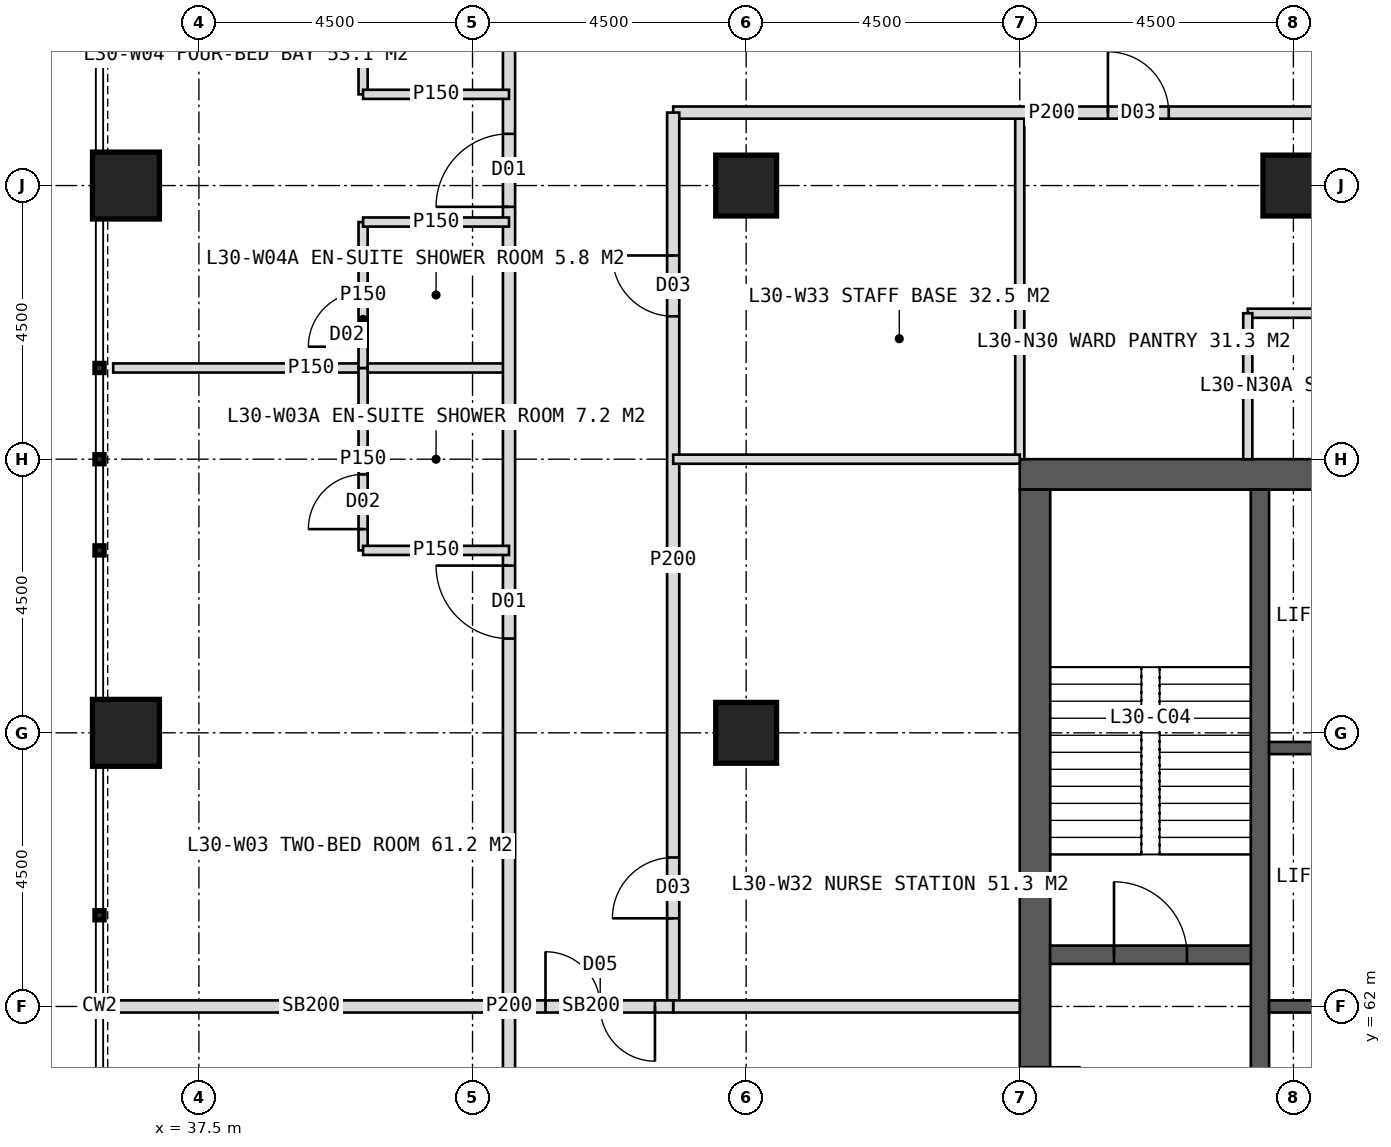
"""IFC4 building model, lengths in metres.
Left out: names, types, materials, properties, quantities, classifications, styles, units other than length and angle.
Written with IfcOpenShell. Run it as: python <this file> out.ifc"""

import sys

from ifc_helpers import new_model, si_unit, direction, frame, frame_2d, origin, origin_2d, place, context, subcontext, project, spatial, rectangle, hollow_rectangle, extrude, element, fill, save


model = new_model("IFC4")
c1 = context("Model", 3, precision=1e-05, world=origin(), true_north=direction((0.0, 1.0)))
c2 = subcontext(c1, "Body", "Model", "MODEL_VIEW")
j1 = project(units=[si_unit("LENGTHUNIT", "METRE"), si_unit("PLANEANGLEUNIT", "RADIAN")], contexts=[c1])
p1 = place(None, origin())
s1 = spatial("IfcSite", under=j1, at=p1, CompositionType="ELEMENT")
p2 = place(p1, origin())
s2 = spatial("IfcBuilding", under=s1, at=p2, CompositionType="ELEMENT")
p3 = place(p2, frame((0.0, 0.0, 128.0)))
s3 = spatial("IfcBuildingStorey", under=s2, at=p3, CompositionType="ELEMENT", Elevation=128.0)
p4 = place(p3, frame((51.0, 70.75, 0.0), z_axis=(0.0, 0.0, 1.0), x_axis=(1.0, 0.0, 0.0)))
e1 = element("IfcWall", 1, at=p4, inside=s3, PredefinedType="SHEAR", context=c2, shape_type="SweptSolid", body=[
    extrude(rectangle(XDim=18.0, YDim=0.5, at=frame_2d((9.0, 0.0))), origin(), (0.0, 0.0, 1.0), 4.0),
])
p5 = place(p4, frame((8.1, 0.0, 0.0)))
e2 = element("IfcOpeningElement", 2, at=p5, cuts=e1, PredefinedType="OPENING", context=c2, shape_type="SweptSolid", body=[
    extrude(rectangle(XDim=1.8, YDim=2.2, at=frame_2d((0.9, 1.1))), frame((0.0, 0.26, 0.0), z_axis=(0.0, -1.0, 0.0), x_axis=(1.0, 0.0, 0.0)), (0.0, 0.0, 1.0), 0.52),
])
p6 = place(p3, frame((51.25, 53.5, 0.0), z_axis=(0.0, 0.0, 1.0), x_axis=(0.0, 1.0, 0.0)))
e3 = element("IfcWall", 3, at=p6, inside=s3, PredefinedType="SHEAR", context=c2, shape_type="SweptSolid", body=[
    extrude(rectangle(XDim=17.0, YDim=0.5, at=frame_2d((8.5, 0.0))), origin(), (0.0, 0.0, 1.0), 4.0),
])
p7 = place(p6, frame((6.0, 0.0, 0.0)))
e4 = element("IfcOpeningElement", 4, at=p7, cuts=e3, PredefinedType="OPENING", context=c2, shape_type="SweptSolid", body=[
    extrude(rectangle(XDim=1.5, YDim=2.2, at=frame_2d((0.75, 1.1))), frame((0.0, 0.26, 0.0), z_axis=(0.0, -1.0, 0.0), x_axis=(1.0, 0.0, 0.0)), (0.0, 0.0, 1.0), 0.52),
])
p8 = place(p3, frame((54.95, 53.5, 0.0), z_axis=(0.0, 0.0, 1.0), x_axis=(0.0, 1.0, 0.0)))
e5 = element("IfcWall", 5, at=p8, inside=s3, PredefinedType="SHEAR", context=c2, shape_type="SweptSolid", body=[
    extrude(rectangle(XDim=17.0, YDim=0.3, at=frame_2d((8.5, 0.0))), origin(), (0.0, 0.0, 1.0), 4.0),
])
for number, where, z_axis, x_axis in (
    (6, (55.1, 62.0, 0.0), (0.0, 0.0, 1.0), (1.0, 0.0, 0.0)),
    (7, (55.1, 66.25, 0.0), (0.0, 0.0, 1.0), (1.0, 0.0, 0.0)),
):
    element("IfcWall", number, at=place(p3, frame(where, z_axis=z_axis, x_axis=x_axis)), inside=s3, PredefinedType="SHEAR", context=c2, shape_type="SweptSolid", body=[
        extrude(rectangle(XDim=3.05, YDim=0.2, at=frame_2d((1.525, 0.0))), origin(), (0.0, 0.0, 1.0), 4.0),
    ])
p9 = place(p3, frame((51.5, 62.85, 0.0), z_axis=(0.0, 0.0, 1.0), x_axis=(1.0, 0.0, 0.0)))
e8 = element("IfcWall", 8, at=p9, inside=s3, PredefinedType="SHEAR", context=c2, shape_type="SweptSolid", body=[
    extrude(rectangle(XDim=3.3, YDim=0.3, at=frame_2d((1.65, 0.0))), origin(), (0.0, 0.0, 1.0), 4.0),
])
p10 = place(p9, frame((1.05, 0.0, 0.0)))
e9 = element("IfcOpeningElement", 9, at=p10, cuts=e8, PredefinedType="OPENING", context=c2, shape_type="SweptSolid", body=[
    extrude(rectangle(XDim=1.2, YDim=2.1, at=frame_2d((0.6, 1.05))), frame((0.0, 0.16, 0.0), z_axis=(0.0, -1.0, 0.0), x_axis=(1.0, 0.0, 0.0)), (0.0, 0.0, 1.0), 0.32),
])
for number, where, z_axis, x_axis in (
    (10, (46.5, 75.5, 0.0), (0.0, 0.0, 1.0), (1.0, 0.0, 0.0)),
    (11, (55.5, 75.5, 0.0), (0.0, 0.0, 1.0), (1.0, 0.0, 0.0)),
    (12, (46.5, 66.5, 0.0), (0.0, 0.0, 1.0), (1.0, 0.0, 0.0)),
):
    element("IfcColumn", number, at=place(p3, frame(where, z_axis=z_axis, x_axis=x_axis)), inside=s3, PredefinedType="COLUMN", context=c2, shape_type="SweptSolid", body=[
        extrude(hollow_rectangle(XDim=1.0, YDim=1.0, WallThickness=0.1, at=origin_2d()), origin(), (0.0, 0.0, 1.0), 4.0),
    ])
for number, where, z_axis, x_axis in (
    (13, (36.3, 66.5, 0.0), (0.0, 0.0, 1.0), (1.0, 0.0, 0.0)),
    (14, (36.3, 75.5, 0.0), (0.0, 0.0, 1.0), (1.0, 0.0, 0.0)),
):
    element("IfcColumn", number, at=place(p3, frame(where, z_axis=z_axis, x_axis=x_axis)), inside=s3, PredefinedType="COLUMN", context=c2, shape_type="SweptSolid", body=[
        extrude(hollow_rectangle(XDim=1.1, YDim=1.1, WallThickness=0.1, at=origin_2d()), origin(), (0.0, 0.0, 1.0), 4.0),
    ])
p11 = place(p3, frame((51.0, 71.0, 0.0), z_axis=(0.0, 0.0, 1.0), x_axis=(0.0, 1.0, 0.0)))
e15 = element("IfcWall", 15, at=p11, inside=s3, PredefinedType="PARTITIONING", context=c2, shape_type="SweptSolid", body=[
    extrude(rectangle(XDim=5.7, YDim=0.15, at=frame_2d((2.85, 0.0))), origin(), (0.0, 0.0, 1.0), 3.75),
])
p12 = place(p3, frame((45.3, 76.7, 0.0), z_axis=(0.0, 0.0, 1.0), x_axis=(1.0, 0.0, 0.0)))
e16 = element("IfcWall", 16, at=p12, inside=s3, PredefinedType="PARTITIONING", context=c2, shape_type="SweptSolid", body=[
    extrude(rectangle(XDim=12.45, YDim=0.2, at=frame_2d((6.225, 0.0))), origin(), (0.0, 0.0, 1.0), 3.75),
])
p13 = place(p12, frame((7.15, 0.0, 0.0)))
e17 = element("IfcOpeningElement", 17, at=p13, cuts=e16, PredefinedType="OPENING", context=c2, shape_type="SweptSolid", body=[
    extrude(rectangle(XDim=1.0, YDim=2.1, at=frame_2d((0.5, 1.05))), frame((0.0, 0.11, 0.0), z_axis=(0.0, -1.0, 0.0), x_axis=(1.0, 0.0, 0.0)), (0.0, 0.0, 1.0), 0.22),
])
p14 = place(p3, frame((54.75, 73.4, 0.0), z_axis=(0.0, 0.0, 1.0), x_axis=(1.0, 0.0, 0.0)))
e18 = element("IfcWall", 18, at=p14, inside=s3, PredefinedType="PARTITIONING", context=c2, shape_type="SweptSolid", body=[
    extrude(rectangle(XDim=3.0, YDim=0.15, at=frame_2d((1.5, 0.0))), origin(), (0.0, 0.0, 1.0), 3.75),
])
p15 = place(p3, frame((54.75, 71.0, 0.0), z_axis=(0.0, 0.0, 1.0), x_axis=(0.0, 1.0, 0.0)))
e19 = element("IfcWall", 19, at=p15, inside=s3, PredefinedType="PARTITIONING", context=c2, shape_type="SweptSolid", body=[
    extrude(rectangle(XDim=2.4, YDim=0.15, at=frame_2d((1.2, 0.0))), origin(), (0.0, 0.0, 1.0), 3.75),
])
p16 = place(p3, frame((42.6, 62.0, 0.0), z_axis=(0.0, 0.0, 1.0), x_axis=(-1.0, 0.0, 0.0)))
e20 = element("IfcWall", 20, at=p16, inside=s3, PredefinedType="SOLIDWALL", context=c2, shape_type="SweptSolid", body=[
    extrude(rectangle(XDim=6.51, YDim=0.2, at=frame_2d((3.255, 0.0))), origin(), (0.0, 0.0, 1.0), 2.95),
])
p17 = place(p3, frame((42.6, 72.5, 0.0), z_axis=(0.0, 0.0, 1.0), x_axis=(-1.0, 0.0, 0.0)))
e21 = element("IfcWall", 21, at=p17, inside=s3, PredefinedType="PARTITIONING", context=c2, shape_type="SweptSolid", body=[
    extrude(rectangle(XDim=6.51, YDim=0.15, at=frame_2d((3.255, 0.0))), origin(), (0.0, 0.0, 1.0), 3.75),
])
p18 = place(p3, frame((42.6, 44.6, 0.0), z_axis=(0.0, 0.0, 1.0), x_axis=(0.0, 1.0, 0.0)))
e22 = element("IfcWall", 22, at=p18, inside=s3, PredefinedType="PARTITIONING", context=c2, shape_type="SweptSolid", body=[
    extrude(rectangle(XDim=34.8, YDim=0.2, at=frame_2d((17.4, 0.0))), origin(), (0.0, 0.0, 1.0), 3.75),
])
p19 = place(p18, frame((2.45, 0.0, 0.0)))
e23 = element("IfcOpeningElement", 23, at=p19, cuts=e22, PredefinedType="OPENING", context=c2, shape_type="SweptSolid", body=[
    extrude(rectangle(XDim=1.2, YDim=2.2, at=frame_2d((0.6, 1.1))), frame((0.0, 0.11, 0.0), z_axis=(0.0, -1.0, 0.0), x_axis=(1.0, 0.0, 0.0)), (0.0, 0.0, 1.0), 0.22),
])
p20 = place(p18, frame((10.15, 0.0, 0.0)))
e24 = element("IfcOpeningElement", 24, at=p20, cuts=e22, PredefinedType="OPENING", context=c2, shape_type="SweptSolid", body=[
    extrude(rectangle(XDim=1.2, YDim=2.2, at=frame_2d((0.6, 1.1))), frame((0.0, 0.11, 0.0), z_axis=(0.0, -1.0, 0.0), x_axis=(1.0, 0.0, 0.0)), (0.0, 0.0, 1.0), 0.22),
])
p21 = place(p18, frame((23.45, 0.0, 0.0)))
e25 = element("IfcOpeningElement", 25, at=p21, cuts=e22, PredefinedType="OPENING", context=c2, shape_type="SweptSolid", body=[
    extrude(rectangle(XDim=1.2, YDim=2.2, at=frame_2d((0.6, 1.1))), frame((0.0, 0.11, 0.0), z_axis=(0.0, -1.0, 0.0), x_axis=(1.0, 0.0, 0.0)), (0.0, 0.0, 1.0), 0.22),
])
p22 = place(p18, frame((30.55, 0.0, 0.0)))
e26 = element("IfcOpeningElement", 26, at=p22, cuts=e22, PredefinedType="OPENING", context=c2, shape_type="SweptSolid", body=[
    extrude(rectangle(XDim=1.2, YDim=2.2, at=frame_2d((0.6, 1.1))), frame((0.0, 0.11, 0.0), z_axis=(0.0, -1.0, 0.0), x_axis=(1.0, 0.0, 0.0)), (0.0, 0.0, 1.0), 0.22),
])
p23 = place(p3, frame((40.2, 69.5, 0.0), z_axis=(0.0, 0.0, 1.0), x_axis=(0.0, 1.0, 0.0)))
e27 = element("IfcWall", 27, at=p23, inside=s3, PredefinedType="PARTITIONING", context=c2, shape_type="SweptSolid", body=[
    extrude(rectangle(XDim=3.0, YDim=0.15, at=frame_2d((1.5, 0.0))), origin(), (0.0, 0.0, 1.0), 3.75),
])
p24 = place(p23, frame((0.35, 0.0, 0.0)))
e28 = element("IfcOpeningElement", 28, at=p24, cuts=e27, PredefinedType="OPENING", context=c2, shape_type="SweptSolid", body=[
    extrude(rectangle(XDim=0.9, YDim=2.1, at=frame_2d((0.45, 1.05))), frame((0.0, 0.085, 0.0), z_axis=(0.0, -1.0, 0.0), x_axis=(1.0, 0.0, 0.0)), (0.0, 0.0, 1.0), 0.17),
])
p25 = place(p3, frame((42.6, 69.5, 0.0), z_axis=(0.0, 0.0, 1.0), x_axis=(-1.0, 0.0, 0.0)))
e29 = element("IfcWall", 29, at=p25, inside=s3, PredefinedType="PARTITIONING", context=c2, shape_type="SweptSolid", body=[
    extrude(rectangle(XDim=2.4, YDim=0.15, at=frame_2d((1.2, 0.0))), origin(), (0.0, 0.0, 1.0), 3.75),
])
p26 = place(p3, frame((40.2, 72.5, 0.0), z_axis=(0.0, 0.0, 1.0), x_axis=(0.0, 1.0, 0.0)))
e30 = element("IfcWall", 30, at=p26, inside=s3, PredefinedType="PARTITIONING", context=c2, shape_type="SweptSolid", body=[
    extrude(rectangle(XDim=2.4, YDim=0.15, at=frame_2d((1.2, 0.0))), origin(), (0.0, 0.0, 1.0), 3.75),
])
p27 = place(p26, frame((0.35, 0.0, 0.0)))
e31 = element("IfcOpeningElement", 31, at=p27, cuts=e30, PredefinedType="OPENING", context=c2, shape_type="SweptSolid", body=[
    extrude(rectangle(XDim=0.9, YDim=2.1, at=frame_2d((0.45, 1.05))), frame((0.0, 0.085, 0.0), z_axis=(0.0, -1.0, 0.0), x_axis=(1.0, 0.0, 0.0)), (0.0, 0.0, 1.0), 0.17),
])
p28 = place(p3, frame((42.6, 74.9, 0.0), z_axis=(0.0, 0.0, 1.0), x_axis=(-1.0, 0.0, 0.0)))
e32 = element("IfcWall", 32, at=p28, inside=s3, PredefinedType="PARTITIONING", context=c2, shape_type="SweptSolid", body=[
    extrude(rectangle(XDim=2.4, YDim=0.15, at=frame_2d((1.2, 0.0))), origin(), (0.0, 0.0, 1.0), 3.75),
])
p29 = place(p3, frame((40.2, 77.0, 0.0), z_axis=(0.0, 0.0, 1.0), x_axis=(0.0, 1.0, 0.0)))
e33 = element("IfcWall", 33, at=p29, inside=s3, PredefinedType="PARTITIONING", context=c2, shape_type="SweptSolid", body=[
    extrude(rectangle(XDim=2.4, YDim=0.15, at=frame_2d((1.2, 0.0))), origin(), (0.0, 0.0, 1.0), 3.75),
])
p30 = place(p29, frame((1.15, 0.0, 0.0)))
e34 = element("IfcOpeningElement", 34, at=p30, cuts=e33, PredefinedType="OPENING", context=c2, shape_type="SweptSolid", body=[
    extrude(rectangle(XDim=0.9, YDim=2.1, at=frame_2d((0.45, 1.05))), frame((0.0, 0.085, 0.0), z_axis=(0.0, -1.0, 0.0), x_axis=(1.0, 0.0, 0.0)), (0.0, 0.0, 1.0), 0.17),
])
p31 = place(p3, frame((42.6, 77.0, 0.0), z_axis=(0.0, 0.0, 1.0), x_axis=(-1.0, 0.0, 0.0)))
e35 = element("IfcWall", 35, at=p31, inside=s3, PredefinedType="PARTITIONING", context=c2, shape_type="SweptSolid", body=[
    extrude(rectangle(XDim=2.4, YDim=0.15, at=frame_2d((1.2, 0.0))), origin(), (0.0, 0.0, 1.0), 3.75),
])
p32 = place(p3, frame((45.3, 62.0, 0.0), z_axis=(0.0, 0.0, 1.0), x_axis=(0.0, 1.0, 0.0)))
e36 = element("IfcWall", 36, at=p32, inside=s3, PredefinedType="PARTITIONING", context=c2, shape_type="SweptSolid", body=[
    extrude(rectangle(XDim=14.7, YDim=0.2, at=frame_2d((7.35, 0.0))), origin(), (0.0, 0.0, 1.0), 3.75),
])
p33 = place(p32, frame((1.45, 0.0, 0.0)))
e37 = element("IfcOpeningElement", 37, at=p33, cuts=e36, PredefinedType="OPENING", context=c2, shape_type="SweptSolid", body=[
    extrude(rectangle(XDim=1.0, YDim=2.1, at=frame_2d((0.5, 1.05))), frame((0.0, 0.11, 0.0), z_axis=(0.0, -1.0, 0.0), x_axis=(1.0, 0.0, 0.0)), (0.0, 0.0, 1.0), 0.22),
])
p34 = place(p32, frame((11.35, 0.0, 0.0)))
e38 = element("IfcOpeningElement", 38, at=p34, cuts=e36, PredefinedType="OPENING", context=c2, shape_type="SweptSolid", body=[
    extrude(rectangle(XDim=1.0, YDim=2.1, at=frame_2d((0.5, 1.05))), frame((0.0, 0.11, 0.0), z_axis=(0.0, -1.0, 0.0), x_axis=(1.0, 0.0, 0.0)), (0.0, 0.0, 1.0), 0.22),
])
p35 = place(p3, frame((51.0, 62.0, 0.0), z_axis=(0.0, 0.0, 1.0), x_axis=(-1.0, 0.0, 0.0)))
e39 = element("IfcWall", 39, at=p35, inside=s3, PredefinedType="SOLIDWALL", context=c2, shape_type="SweptSolid", body=[
    extrude(rectangle(XDim=5.7, YDim=0.2, at=frame_2d((2.85, 0.0))), origin(), (0.0, 0.0, 1.0), 2.95),
])
p36 = place(p3, frame((51.0, 71.0, 0.0), z_axis=(0.0, 0.0, 1.0), x_axis=(-1.0, 0.0, 0.0)))
e40 = element("IfcWall", 40, at=p36, inside=s3, PredefinedType="PARTITIONING", context=c2, shape_type="SweptSolid", body=[
    extrude(rectangle(XDim=5.7, YDim=0.15, at=frame_2d((2.85, 0.0))), origin(), (0.0, 0.0, 1.0), 3.75),
])
p37 = place(p3, frame((45.3, 62.0, 0.0), z_axis=(0.0, 0.0, 1.0), x_axis=(-1.0, 0.0, 0.0)))
e41 = element("IfcWall", 41, at=p37, inside=s3, PredefinedType="SOLIDWALL", context=c2, shape_type="SweptSolid", body=[
    extrude(rectangle(XDim=2.7, YDim=0.2, at=frame_2d((1.35, 0.0))), origin(), (0.0, 0.0, 1.0), 2.95),
])
p38 = place(p37, frame((0.3, 0.0, 0.0)))
e42 = element("IfcOpeningElement", 42, at=p38, cuts=e41, PredefinedType="OPENING", context=c2, shape_type="SweptSolid", body=[
    extrude(rectangle(XDim=1.8, YDim=2.2, at=frame_2d((0.9, 1.1))), frame((0.0, 0.11, 0.0), z_axis=(0.0, -1.0, 0.0), x_axis=(1.0, 0.0, 0.0)), (0.0, 0.0, 1.0), 0.22),
])
p39 = place(p13, origin())
e43 = element("IfcDoor", 43, at=p39, inside=s3, OperationType="SINGLE_SWING_LEFT", PredefinedType="DOOR", context=c2, shape_type="SweptSolid", body=[
    extrude(rectangle(XDim=1.0, YDim=2.1, at=frame_2d((0.5, 1.05))), frame((0.0, 0.025, 0.0), z_axis=(0.0, -1.0, 0.0), x_axis=(1.0, 0.0, 0.0)), (0.0, 0.0, 1.0), 0.05),
])
fill(e17, e43)
p40 = place(p21, origin())
e44 = element("IfcDoor", 44, at=p40, inside=s3, OperationType="SINGLE_SWING_RIGHT", PredefinedType="DOOR", context=c2, shape_type="SweptSolid", body=[
    extrude(rectangle(XDim=1.2, YDim=2.2, at=frame_2d((0.6, 1.1))), frame((0.0, 0.025, 0.0), z_axis=(0.0, -1.0, 0.0), x_axis=(1.0, 0.0, 0.0)), (0.0, 0.0, 1.0), 0.05),
])
fill(e25, e44)
p41 = place(p24, origin())
e45 = element("IfcDoor", 45, at=p41, inside=s3, OperationType="SINGLE_SWING_LEFT", PredefinedType="DOOR", context=c2, shape_type="SweptSolid", body=[
    extrude(rectangle(XDim=0.9, YDim=2.1, at=frame_2d((0.45, 1.05))), frame((0.0, 0.025, 0.0), z_axis=(0.0, -1.0, 0.0), x_axis=(1.0, 0.0, 0.0)), (0.0, 0.0, 1.0), 0.05),
])
fill(e28, e45)
p42 = place(p22, origin())
e46 = element("IfcDoor", 46, at=p42, inside=s3, OperationType="SINGLE_SWING_LEFT", PredefinedType="DOOR", context=c2, shape_type="SweptSolid", body=[
    extrude(rectangle(XDim=1.2, YDim=2.2, at=frame_2d((0.6, 1.1))), frame((0.0, 0.025, 0.0), z_axis=(0.0, -1.0, 0.0), x_axis=(1.0, 0.0, 0.0)), (0.0, 0.0, 1.0), 0.05),
])
fill(e26, e46)
p43 = place(p27, origin())
e47 = element("IfcDoor", 47, at=p43, inside=s3, OperationType="SINGLE_SWING_LEFT", PredefinedType="DOOR", context=c2, shape_type="SweptSolid", body=[
    extrude(rectangle(XDim=0.9, YDim=2.1, at=frame_2d((0.45, 1.05))), frame((0.0, 0.025, 0.0), z_axis=(0.0, -1.0, 0.0), x_axis=(1.0, 0.0, 0.0)), (0.0, 0.0, 1.0), 0.05),
])
fill(e31, e47)
p44 = place(p33, origin())
e48 = element("IfcDoor", 48, at=p44, inside=s3, OperationType="SINGLE_SWING_LEFT", PredefinedType="DOOR", context=c2, shape_type="SweptSolid", body=[
    extrude(rectangle(XDim=1.0, YDim=2.1, at=frame_2d((0.5, 1.05))), frame((0.0, 0.025, 0.0), z_axis=(0.0, -1.0, 0.0), x_axis=(1.0, 0.0, 0.0)), (0.0, 0.0, 1.0), 0.05),
])
fill(e37, e48)
p45 = place(p34, origin())
e49 = element("IfcDoor", 49, at=p45, inside=s3, OperationType="SINGLE_SWING_RIGHT", PredefinedType="DOOR", context=c2, shape_type="SweptSolid", body=[
    extrude(rectangle(XDim=1.0, YDim=2.1, at=frame_2d((0.5, 1.05))), frame((0.0, 0.025, 0.0), z_axis=(0.0, -1.0, 0.0), x_axis=(1.0, 0.0, 0.0)), (0.0, 0.0, 1.0), 0.05),
])
fill(e38, e49)
p46 = place(p38, origin())
e50 = element("IfcDoor", 50, at=p46, inside=s3, OperationType="DOUBLE_DOOR_DOUBLE_SWING", PredefinedType="DOOR", context=c2, shape_type="SweptSolid", body=[
    extrude(rectangle(XDim=1.8, YDim=2.2, at=frame_2d((0.9, 1.1))), frame((0.0, 0.025, 0.0), z_axis=(0.0, -1.0, 0.0), x_axis=(1.0, 0.0, 0.0)), (0.0, 0.0, 1.0), 0.05),
])
fill(e42, e50)
p47 = place(p10, origin())
e51 = element("IfcDoor", 51, at=p47, inside=s3, OperationType="SINGLE_SWING_LEFT", PredefinedType="DOOR", context=c2, shape_type="SweptSolid", body=[
    extrude(rectangle(XDim=1.2, YDim=2.1, at=frame_2d((0.6, 1.05))), frame((0.0, 0.025, 0.0), z_axis=(0.0, -1.0, 0.0), x_axis=(1.0, 0.0, 0.0)), (0.0, 0.0, 1.0), 0.05),
])
fill(e9, e51)
save(model, sys.argv[1])
